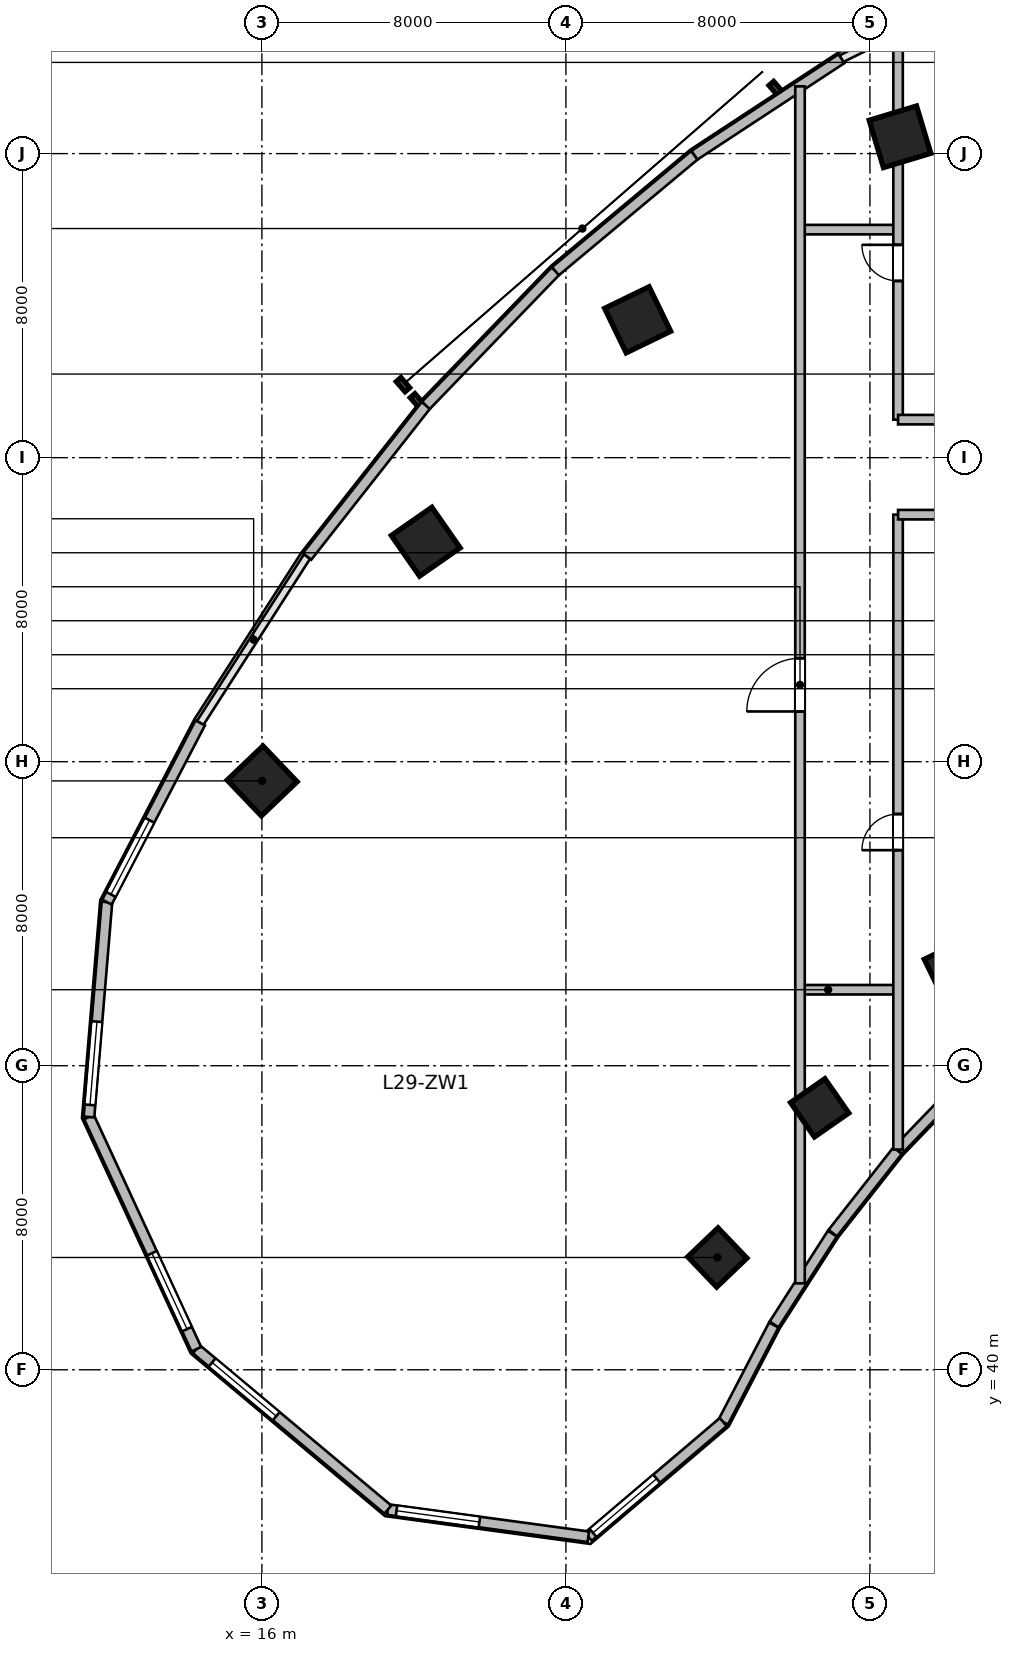
"""IFC4 building model, lengths in metres.
Left out: names, types, materials, properties, quantities, classifications, styles, units other than length and angle.
Written with IfcOpenShell. Run it as: python <this file> out.ifc"""

import sys

from ifc_helpers import new_model, si_unit, direction, frame, frame_2d, origin, origin_2d, place, context, subcontext, project, spatial, rectangle, extrude, source, transform, mapped, element, fill, save


model = new_model("IFC4")
c1 = context("Model", 3, precision=1e-05, world=origin(), true_north=direction((0.0, 1.0)))
c2 = subcontext(c1, "Body", "Model", "MODEL_VIEW")
j1 = project(units=[si_unit("LENGTHUNIT", "METRE"), si_unit("PLANEANGLEUNIT", "RADIAN")], contexts=[c1])
p1 = place(None, origin())
s1 = spatial("IfcSite", under=j1, at=p1, CompositionType="ELEMENT")
p2 = place(p1, origin())
s2 = spatial("IfcBuilding", under=s1, at=p2, CompositionType="ELEMENT")
p3 = place(p2, frame((0.0, 0.0, 123.3)))
s3 = spatial("IfcBuildingStorey", under=s2, at=p3, CompositionType="ELEMENT", Elevation=123.3)
m1 = source(origin(), c2, "Body", "SweptSolid", [
    extrude(rectangle(XDim=1.1, YDim=1.1, at=origin_2d()), origin(), (0.0, 0.0, 1.0), 3.9),
])
p4 = place(p3, frame((27.985, 42.955, 0.0), z_axis=(0.0, 0.0, 1.0), x_axis=(-0.690756218984, 0.723087716626, 0.0)))
e1 = element("IfcColumn", 1, at=p4, inside=s3, PredefinedType="COLUMN", context=c2, shape_type="MappedRepresentation", body=[
    mapped(m1, transform((0.0, 0.0, 0.0), scale=1.0)),
])
m2 = source(origin(), c2, "Body", "SweptSolid", [
    extrude(rectangle(XDim=1.3, YDim=1.3, at=origin_2d()), origin(), (0.0, 0.0, 1.0), 3.9),
])
p5 = place(p3, frame((16.007, 55.494, 0.0), z_axis=(0.0, 0.0, 1.0), x_axis=(-0.690756218984, 0.723087716626, 0.0)))
e2 = element("IfcColumn", 2, at=p5, inside=s3, PredefinedType="COLUMN", context=c2, shape_type="MappedRepresentation", body=[
    mapped(m2, transform((0.0, 0.0, 0.0), scale=1.0)),
])
p6 = place(p3, frame((30.677, 46.892, 0.0), z_axis=(0.0, 0.0, 1.0), x_axis=(-0.571143442153, 0.820850271661, 0.0)))
e3 = element("IfcColumn", 3, at=p6, inside=s3, PredefinedType="COLUMN", context=c2, shape_type="MappedRepresentation", body=[
    mapped(m1, transform((0.0, 0.0, 0.0), scale=1.0)),
])
p7 = place(p3, frame((20.311, 61.789, 0.0), z_axis=(0.0, 0.0, 1.0), x_axis=(-0.571143442153, 0.820850271661, 0.0)))
e4 = element("IfcColumn", 4, at=p7, inside=s3, PredefinedType="COLUMN", context=c2, shape_type="MappedRepresentation", body=[
    mapped(m2, transform((0.0, 0.0, 0.0), scale=1.0)),
])
p8 = place(p3, frame((34.166, 50.545, 0.0), z_axis=(0.0, 0.0, 1.0), x_axis=(-0.436173672171, 0.899862504889, 0.0)))
e5 = element("IfcColumn", 5, at=p8, inside=s3, PredefinedType="COLUMN", context=c2, shape_type="MappedRepresentation", body=[
    mapped(m1, transform((0.0, 0.0, 0.0), scale=1.0)),
])
for number, where, z_axis, x_axis in (
    (6, (25.888, 67.627, 0.0), (0.0, 0.0, 1.0), (-0.436, 0.9, 0.0)),
    (7, (32.791, 72.442, 0.0), (0.0, 0.0, 1.0), (-0.289, 0.957, 0.0)),
):
    element("IfcColumn", number, at=place(p3, frame(where, z_axis=z_axis, x_axis=x_axis)), inside=s3, PredefinedType="COLUMN", context=c2, shape_type="MappedRepresentation", body=[
        mapped(m2, transform((0.0, 0.0, 0.0), scale=1.0)),
    ])
m3 = source(origin(), c2, "Body", "SweptSolid", [
    extrude(rectangle(XDim=2.68, YDim=0.28, at=frame_2d((1.34, 0.0))), origin(), (0.0, 0.0, 1.0), 3.65),
])
p9 = place(p3, frame((34.601, 47.708, 0.0), z_axis=(0.0, 0.0, 1.0), x_axis=(-0.694561996568, -0.719432855049, 0.0)))
e8 = element("IfcWall", 8, at=p9, inside=s3, PredefinedType="SOLIDWALL", context=c2, shape_type="MappedRepresentation", body=[
    mapped(m3, transform((0.0, 0.0, 0.0), scale=1.0)),
])
m4 = source(origin(), c2, "Body", "SweptSolid", [
    extrude(rectangle(XDim=2.76, YDim=0.28, at=frame_2d((1.38, 0.0))), origin(), (0.0, 0.0, 1.0), 3.65),
])
p10 = place(p3, frame((32.728, 45.766, 0.0), z_axis=(0.0, 0.0, 1.0), x_axis=(-0.618180818641, -0.786035925047, 0.0)))
e9 = element("IfcWall", 9, at=p10, inside=s3, PredefinedType="SOLIDWALL", context=c2, shape_type="MappedRepresentation", body=[
    mapped(m4, transform((0.0, 0.0, 0.0), scale=1.0)),
])
m5 = source(origin(), c2, "Body", "SweptSolid", [
    extrude(rectangle(XDim=2.84, YDim=0.28, at=frame_2d((1.42, 0.0))), origin(), (0.0, 0.0, 1.0), 3.65),
])
p11 = place(p3, frame((31.011, 43.582, 0.0), z_axis=(0.0, 0.0, 1.0), x_axis=(-0.540214368057, -0.841527442538, 0.0)))
e10 = element("IfcWall", 10, at=p11, inside=s3, PredefinedType="SOLIDWALL", context=c2, shape_type="MappedRepresentation", body=[
    mapped(m5, transform((0.0, 0.0, 0.0), scale=1.0)),
])
m6 = source(origin(), c2, "Body", "SweptSolid", [
    extrude(rectangle(XDim=2.88, YDim=0.28, at=frame_2d((1.44, 0.0))), origin(), (0.0, 0.0, 1.0), 3.65),
])
p12 = place(p3, frame((29.469, 41.178, 0.0), z_axis=(0.0, 0.0, 1.0), x_axis=(-0.461769086658, -0.887000175088, 0.0)))
e11 = element("IfcWall", 11, at=p12, inside=s3, PredefinedType="SOLIDWALL", context=c2, shape_type="MappedRepresentation", body=[
    mapped(m6, transform((0.0, 0.0, 0.0), scale=1.0)),
])
m7 = source(origin(), c2, "Body", "SweptSolid", [
    extrude(rectangle(XDim=4.659, YDim=0.28, at=frame_2d((2.33, 0.0))), origin(), (0.0, 0.0, 1.0), 3.65),
])
p13 = place(p3, frame((28.139, 38.624, 0.0), z_axis=(0.0, 0.0, 1.0), x_axis=(-0.761913458795, -0.647678841176, 0.0)))
e12 = element("IfcWall", 12, at=p13, inside=s3, PredefinedType="SOLIDWALL", context=c2, shape_type="MappedRepresentation", body=[
    mapped(m7, transform((0.0, 0.0, 0.0), scale=1.0)),
])
p14 = place(p13, frame((2.299, 0.0, 0.95)))
e13 = element("IfcOpeningElement", 13, at=p14, cuts=e12, PredefinedType="OPENING", context=c2, shape_type="SweptSolid", body=[
    extrude(rectangle(XDim=2.2, YDim=2.1, at=frame_2d((1.1, 1.05))), frame((0.0, 0.15, 0.0), z_axis=(0.0, -1.0, 0.0), x_axis=(1.0, 0.0, 0.0)), (0.0, 0.0, 1.0), 0.3),
])
m8 = source(origin(), c2, "Body", "SweptSolid", [
    extrude(rectangle(XDim=5.324, YDim=0.28, at=frame_2d((2.662, 0.0))), origin(), (0.0, 0.0, 1.0), 3.65),
])
p15 = place(p3, frame((24.59, 35.606, 0.0), z_axis=(0.0, 0.0, 1.0), x_axis=(-0.990931467223, 0.134368252451, 0.0)))
e14 = element("IfcWall", 14, at=p15, inside=s3, PredefinedType="SOLIDWALL", context=c2, shape_type="MappedRepresentation", body=[
    mapped(m8, transform((0.0, 0.0, 0.0), scale=1.0)),
])
p16 = place(p15, frame((2.893, 0.0, 0.95)))
e15 = element("IfcOpeningElement", 15, at=p16, cuts=e14, PredefinedType="OPENING", context=c2, shape_type="SweptSolid", body=[
    extrude(rectangle(XDim=2.2, YDim=2.1, at=frame_2d((1.1, 1.05))), frame((0.0, 0.15, 0.0), z_axis=(0.0, -1.0, 0.0), x_axis=(1.0, 0.0, 0.0)), (0.0, 0.0, 1.0), 0.3),
])
m9 = source(origin(), c2, "Body", "SweptSolid", [
    extrude(rectangle(XDim=6.573, YDim=0.28, at=frame_2d((3.287, 0.0))), origin(), (0.0, 0.0, 1.0), 3.65),
])
p17 = place(p3, frame((19.314, 36.322, 0.0), z_axis=(0.0, 0.0, 1.0), x_axis=(-0.766715154163, 0.641987439423, 0.0)))
e16 = element("IfcWall", 16, at=p17, inside=s3, PredefinedType="SOLIDWALL", context=c2, shape_type="MappedRepresentation", body=[
    mapped(m9, transform((0.0, 0.0, 0.0), scale=1.0)),
])
p18 = place(p17, frame((3.83, 0.0, 0.95)))
e17 = element("IfcOpeningElement", 17, at=p18, cuts=e16, PredefinedType="OPENING", context=c2, shape_type="SweptSolid", body=[
    extrude(rectangle(XDim=2.2, YDim=2.1, at=frame_2d((1.1, 1.05))), frame((0.0, 0.15, 0.0), z_axis=(0.0, -1.0, 0.0), x_axis=(1.0, 0.0, 0.0)), (0.0, 0.0, 1.0), 0.3),
])
m10 = source(origin(), c2, "Body", "SweptSolid", [
    extrude(rectangle(XDim=6.732, YDim=0.28, at=frame_2d((3.366, 0.0))), origin(), (0.0, 0.0, 1.0), 3.65),
])
p19 = place(p3, frame((14.275, 40.541, 0.0), z_axis=(0.0, 0.0, 1.0), x_axis=(-0.419644552709, 0.907688520023, 0.0)))
e18 = element("IfcWall", 18, at=p19, inside=s3, PredefinedType="SOLIDWALL", context=c2, shape_type="MappedRepresentation", body=[
    mapped(m10, transform((0.0, 0.0, 0.0), scale=1.0)),
])
p20 = place(p19, frame((0.583, 0.0, 0.95)))
e19 = element("IfcOpeningElement", 19, at=p20, cuts=e18, PredefinedType="OPENING", context=c2, shape_type="SweptSolid", body=[
    extrude(rectangle(XDim=2.2, YDim=2.1, at=frame_2d((1.1, 1.05))), frame((0.0, 0.15, 0.0), z_axis=(0.0, -1.0, 0.0), x_axis=(1.0, 0.0, 0.0)), (0.0, 0.0, 1.0), 0.3),
])
m11 = source(origin(), c2, "Body", "SweptSolid", [
    extrude(rectangle(XDim=5.674, YDim=0.28, at=frame_2d((2.837, 0.0))), origin(), (0.0, 0.0, 1.0), 3.65),
])
p21 = place(p3, frame((11.45, 46.652, 0.0), z_axis=(0.0, 0.0, 1.0), x_axis=(0.083309007867, 0.996523762491, 0.0)))
e20 = element("IfcWall", 20, at=p21, inside=s3, PredefinedType="SOLIDWALL", context=c2, shape_type="MappedRepresentation", body=[
    mapped(m11, transform((0.0, 0.0, 0.0), scale=1.0)),
])
p22 = place(p21, frame((0.318, 0.0, 0.95)))
e21 = element("IfcOpeningElement", 21, at=p22, cuts=e20, PredefinedType="OPENING", context=c2, shape_type="SweptSolid", body=[
    extrude(rectangle(XDim=2.2, YDim=2.1, at=frame_2d((1.1, 1.05))), frame((0.0, 0.15, 0.0), z_axis=(0.0, -1.0, 0.0), x_axis=(1.0, 0.0, 0.0)), (0.0, 0.0, 1.0), 0.3),
])
m12 = source(origin(), c2, "Body", "SweptSolid", [
    extrude(rectangle(XDim=5.315, YDim=0.28, at=frame_2d((2.658, 0.0))), origin(), (0.0, 0.0, 1.0), 3.65),
])
p23 = place(p3, frame((11.922, 52.305, 0.0), z_axis=(0.0, 0.0, 1.0), x_axis=(0.461760527822, 0.887004630735, 0.0)))
e22 = element("IfcWall", 22, at=p23, inside=s3, PredefinedType="SOLIDWALL", context=c2, shape_type="MappedRepresentation", body=[
    mapped(m12, transform((0.0, 0.0, 0.0), scale=1.0)),
])
p24 = place(p23, frame((0.229, 0.0, 0.95)))
e23 = element("IfcOpeningElement", 23, at=p24, cuts=e22, PredefinedType="OPENING", context=c2, shape_type="SweptSolid", body=[
    extrude(rectangle(XDim=2.2, YDim=2.1, at=frame_2d((1.1, 1.05))), frame((0.0, 0.15, 0.0), z_axis=(0.0, -1.0, 0.0), x_axis=(1.0, 0.0, 0.0)), (0.0, 0.0, 1.0), 0.3),
])
m13 = source(origin(), c2, "Body", "SweptSolid", [
    extrude(rectangle(XDim=5.058, YDim=0.28, at=frame_2d((2.529, 0.0))), origin(), (0.0, 0.0, 1.0), 3.65),
])
p25 = place(p3, frame((17.188, 61.4, 0.0), z_axis=(0.0, 0.0, 1.0), x_axis=(0.618145507434, 0.786063694391, 0.0)))
e24 = element("IfcWall", 24, at=p25, inside=s3, PredefinedType="SOLIDWALL", context=c2, shape_type="MappedRepresentation", body=[
    mapped(m13, transform((0.0, 0.0, 0.0), scale=1.0)),
])
m14 = source(origin(), c2, "Body", "SweptSolid", [
    extrude(rectangle(XDim=4.908, YDim=0.28, at=frame_2d((2.454, 0.0))), origin(), (0.0, 0.0, 1.0), 3.65),
])
p26 = place(p3, frame((20.315, 65.376, 0.0), z_axis=(0.0, 0.0, 1.0), x_axis=(0.694613154328, 0.719383462302, 0.0)))
e25 = element("IfcWall", 25, at=p26, inside=s3, PredefinedType="SOLIDWALL", context=c2, shape_type="MappedRepresentation", body=[
    mapped(m14, transform((0.0, 0.0, 0.0), scale=1.0)),
])
m15 = source(origin(), c2, "Body", "SweptSolid", [
    extrude(rectangle(XDim=4.762, YDim=0.28, at=frame_2d((2.381, 0.0))), origin(), (0.0, 0.0, 1.0), 3.65),
])
p27 = place(p3, frame((23.725, 68.907, 0.0), z_axis=(0.0, 0.0, 1.0), x_axis=(0.767952279762, 0.640507061638, 0.0)))
e26 = element("IfcWall", 26, at=p27, inside=s3, PredefinedType="SOLIDWALL", context=c2, shape_type="MappedRepresentation", body=[
    mapped(m15, transform((0.0, 0.0, 0.0), scale=1.0)),
])
m16 = source(origin(), c2, "Body", "SweptSolid", [
    extrude(rectangle(XDim=4.626, YDim=0.28, at=frame_2d((2.313, 0.0))), origin(), (0.0, 0.0, 1.0), 3.65),
])
p28 = place(p3, frame((27.382, 71.958, 0.0), z_axis=(0.0, 0.0, 1.0), x_axis=(0.83595938331, 0.548791316855, 0.0)))
e27 = element("IfcWall", 27, at=p28, inside=s3, PredefinedType="SOLIDWALL", context=c2, shape_type="MappedRepresentation", body=[
    mapped(m16, transform((0.0, 0.0, 0.0), scale=1.0)),
])
m17 = source(origin(), c2, "Body", "SweptSolid", [
    extrude(rectangle(XDim=2.5, YDim=0.25, at=frame_2d((1.25, 0.0))), origin(), (0.0, 0.0, 1.0), 3.65),
])
for number, where, z_axis, x_axis in (
    (28, (30.2, 50.0, 0.0), (0.0, 0.0, 1.0), (1.0, 0.0, 0.0)),
    (29, (30.2, 70.0, 0.0), (0.0, 0.0, 1.0), (1.0, 0.0, 0.0)),
):
    element("IfcWall", number, at=place(p3, frame(where, z_axis=z_axis, x_axis=x_axis)), inside=s3, PredefinedType="PARTITIONING", context=c2, shape_type="MappedRepresentation", body=[
        mapped(m17, transform((0.0, 0.0, 0.0), scale=1.0)),
    ])
m18 = source(origin(), c2, "Body", "SweptSolid", [
    extrude(rectangle(XDim=31.495, YDim=0.25, at=frame_2d((15.748, 0.0))), origin(), (0.0, 0.0, 1.0), 2.942),
])
p29 = place(p3, frame((30.16, 42.274, 0.0), z_axis=(0.0, 0.0, 1.0), x_axis=(0.0, 1.0, 0.0)))
e30 = element("IfcWall", 30, at=p29, inside=s3, PredefinedType="PARTITIONING", context=c2, shape_type="MappedRepresentation", body=[
    mapped(m18, transform((0.0, 0.0, 0.0), scale=1.0)),
])
p30 = place(p29, frame((15.048, 0.0, 0.0)))
e31 = element("IfcOpeningElement", 31, at=p30, cuts=e30, PredefinedType="OPENING", context=c2, shape_type="SweptSolid", body=[
    extrude(rectangle(XDim=1.4, YDim=2.15, at=frame_2d((0.7, 1.075))), frame((0.0, 0.135, 0.0), z_axis=(0.0, -1.0, 0.0), x_axis=(1.0, 0.0, 0.0)), (0.0, 0.0, 1.0), 0.27),
])
m19 = source(origin(), c2, "Body", "SweptSolid", [
    extrude(rectangle(XDim=16.706, YDim=0.25, at=frame_2d((8.353, 0.0))), origin(), (0.0, 0.0, 1.0), 2.942),
])
p31 = place(p3, frame((32.74, 45.794, 0.0), z_axis=(0.0, 0.0, 1.0), x_axis=(0.0, 1.0, 0.0)))
e32 = element("IfcWall", 32, at=p31, inside=s3, PredefinedType="PARTITIONING", context=c2, shape_type="MappedRepresentation", body=[
    mapped(m19, transform((0.0, 0.0, 0.0), scale=1.0)),
])
p32 = place(p31, frame((7.878, 0.0, 0.0)))
e33 = element("IfcOpeningElement", 33, at=p32, cuts=e32, PredefinedType="OPENING", context=c2, shape_type="SweptSolid", body=[
    extrude(rectangle(XDim=0.95, YDim=2.1, at=frame_2d((0.475, 1.05))), frame((0.0, 0.135, 0.0), z_axis=(0.0, -1.0, 0.0), x_axis=(1.0, 0.0, 0.0)), (0.0, 0.0, 1.0), 0.27),
])
m20 = source(origin(), c2, "Body", "SweptSolid", [
    extrude(rectangle(XDim=1.66, YDim=0.25, at=frame_2d((0.83, 0.0))), origin(), (0.0, 0.0, 1.0), 3.65),
])
p33 = place(p3, frame((32.74, 62.5, 0.0), z_axis=(0.0, 0.0, 1.0), x_axis=(1.0, 0.0, 0.0)))
e34 = element("IfcWall", 34, at=p33, inside=s3, PredefinedType="PARTITIONING", context=c2, shape_type="MappedRepresentation", body=[
    mapped(m20, transform((0.0, 0.0, 0.0), scale=1.0)),
])
m21 = source(origin(), c2, "Body", "SweptSolid", [
    extrude(rectangle(XDim=10.224, YDim=0.25, at=frame_2d((5.112, 0.0))), origin(), (0.0, 0.0, 1.0), 3.65),
])
p34 = place(p3, frame((32.74, 65.0, 0.0), z_axis=(0.0, 0.0, 1.0), x_axis=(0.0, 1.0, 0.0)))
e35 = element("IfcWall", 35, at=p34, inside=s3, PredefinedType="PARTITIONING", context=c2, shape_type="MappedRepresentation", body=[
    mapped(m21, transform((0.0, 0.0, 0.0), scale=1.0)),
])
p35 = place(p34, frame((3.65, 0.0, 0.0)))
e36 = element("IfcOpeningElement", 36, at=p35, cuts=e35, PredefinedType="OPENING", context=c2, shape_type="SweptSolid", body=[
    extrude(rectangle(XDim=0.95, YDim=2.1, at=frame_2d((0.475, 1.05))), frame((0.0, 0.135, 0.0), z_axis=(0.0, -1.0, 0.0), x_axis=(1.0, 0.0, 0.0)), (0.0, 0.0, 1.0), 0.27),
])
p36 = place(p3, frame((32.74, 65.0, 0.0), z_axis=(0.0, 0.0, 1.0), x_axis=(1.0, 0.0, 0.0)))
e37 = element("IfcWall", 37, at=p36, inside=s3, PredefinedType="PARTITIONING", context=c2, shape_type="MappedRepresentation", body=[
    mapped(m20, transform((0.0, 0.0, 0.0), scale=1.0)),
])
m22 = source(origin(), c2, "Body", "SweptSolid", [
    extrude(rectangle(XDim=2.2, YDim=2.1, at=frame_2d((1.1, 1.05))), frame((0.0, 0.03, 0.0), z_axis=(0.0, -1.0, 0.0), x_axis=(1.0, 0.0, 0.0)), (0.0, 0.0, 1.0), 0.06),
])
p37 = place(p14, origin())
e38 = element("IfcWindow", 38, at=p37, inside=s3, PartitioningType="TRIPLE_PANEL_VERTICAL", PredefinedType="WINDOW", context=c2, shape_type="MappedRepresentation", body=[
    mapped(m22, transform((0.0, 0.0, 0.0), scale=1.0)),
])
fill(e13, e38)
p38 = place(p16, origin())
e39 = element("IfcWindow", 39, at=p38, inside=s3, PartitioningType="TRIPLE_PANEL_VERTICAL", PredefinedType="WINDOW", context=c2, shape_type="MappedRepresentation", body=[
    mapped(m22, transform((0.0, 0.0, 0.0), scale=1.0)),
])
fill(e15, e39)
p39 = place(p18, origin())
e40 = element("IfcWindow", 40, at=p39, inside=s3, PartitioningType="TRIPLE_PANEL_VERTICAL", PredefinedType="WINDOW", context=c2, shape_type="MappedRepresentation", body=[
    mapped(m22, transform((0.0, 0.0, 0.0), scale=1.0)),
])
fill(e17, e40)
p40 = place(p20, origin())
e41 = element("IfcWindow", 41, at=p40, inside=s3, PartitioningType="TRIPLE_PANEL_VERTICAL", PredefinedType="WINDOW", context=c2, shape_type="MappedRepresentation", body=[
    mapped(m22, transform((0.0, 0.0, 0.0), scale=1.0)),
])
fill(e19, e41)
p41 = place(p22, origin())
e42 = element("IfcWindow", 42, at=p41, inside=s3, PartitioningType="TRIPLE_PANEL_VERTICAL", PredefinedType="WINDOW", context=c2, shape_type="MappedRepresentation", body=[
    mapped(m22, transform((0.0, 0.0, 0.0), scale=1.0)),
])
fill(e21, e42)
p42 = place(p24, origin())
e43 = element("IfcWindow", 43, at=p42, inside=s3, PartitioningType="TRIPLE_PANEL_VERTICAL", PredefinedType="WINDOW", context=c2, shape_type="MappedRepresentation", body=[
    mapped(m22, transform((0.0, 0.0, 0.0), scale=1.0)),
])
fill(e23, e43)
m23 = source(origin(), c2, "Body", "SweptSolid", [
    extrude(rectangle(XDim=1.4, YDim=2.15, at=frame_2d((0.7, 1.075))), frame((0.0, 0.025, 0.0), z_axis=(0.0, -1.0, 0.0), x_axis=(1.0, 0.0, 0.0)), (0.0, 0.0, 1.0), 0.05),
])
p43 = place(p30, origin())
e44 = element("IfcDoor", 44, at=p43, inside=s3, OperationType="SINGLE_SWING_LEFT", PredefinedType="DOOR", context=c2, shape_type="MappedRepresentation", body=[
    mapped(m23, transform((0.0, 0.0, 0.0), scale=1.0)),
])
fill(e31, e44)
m24 = source(origin(), c2, "Body", "SweptSolid", [
    extrude(rectangle(XDim=0.95, YDim=2.1, at=frame_2d((0.475, 1.05))), frame((0.0, 0.025, 0.0), z_axis=(0.0, -1.0, 0.0), x_axis=(1.0, 0.0, 0.0)), (0.0, 0.0, 1.0), 0.05),
])
p44 = place(p32, origin())
e45 = element("IfcDoor", 45, at=p44, inside=s3, OperationType="SINGLE_SWING_LEFT", PredefinedType="DOOR", context=c2, shape_type="MappedRepresentation", body=[
    mapped(m24, transform((0.0, 0.0, 0.0), scale=1.0)),
])
fill(e33, e45)
p45 = place(p35, origin())
e46 = element("IfcDoor", 46, at=p45, inside=s3, OperationType="SINGLE_SWING_RIGHT", PredefinedType="DOOR", context=c2, shape_type="MappedRepresentation", body=[
    mapped(m24, transform((0.0, 0.0, 0.0), scale=1.0)),
])
fill(e36, e46)
save(model, sys.argv[1])
